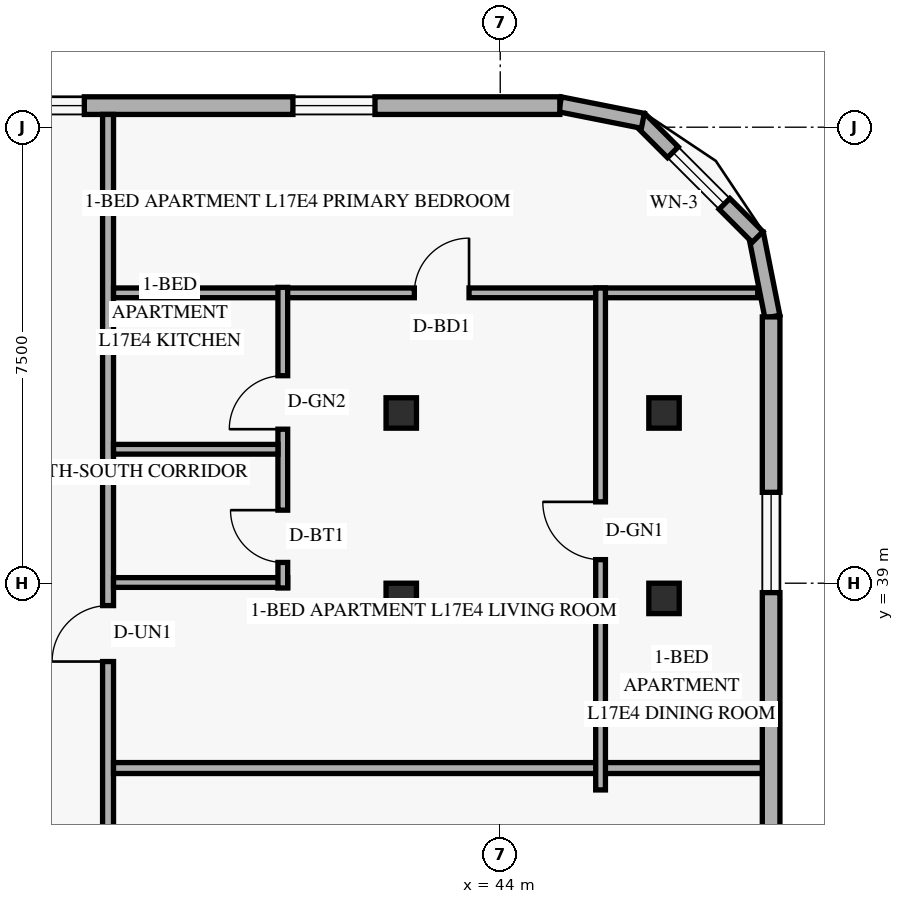
"""IFC4 building model, lengths in metres.
Left out: names, types, materials, properties, quantities, classifications, styles, units other than length and angle.
Written with IfcOpenShell. Run it as: python <this file> out.ifc"""

import sys

from ifc_helpers import new_model, si_unit, direction, frame, frame_2d, origin, origin_2d, place, context, subcontext, project, spatial, rectangle, hollow_rectangle, extrude, element, fill, save


model = new_model("IFC4")
c1 = context("Model", 3, precision=1e-05, world=origin(), true_north=direction((0.0, 1.0)))
c2 = subcontext(c1, "Body", "Model", "MODEL_VIEW")
j1 = project(units=[si_unit("LENGTHUNIT", "METRE"), si_unit("PLANEANGLEUNIT", "RADIAN")], contexts=[c1])
p1 = place(None, origin())
s1 = spatial("IfcSite", under=j1, at=p1, CompositionType="ELEMENT")
p2 = place(p1, origin())
s2 = spatial("IfcBuilding", under=s1, at=p2, CompositionType="ELEMENT")
p3 = place(p2, frame((0.0, 0.0, 67.8)))
s3 = spatial("IfcBuildingStorey", under=s2, at=p3, CompositionType="ELEMENT", Elevation=67.8)
for number, where, z_axis, x_axis in (
    (1, (42.309, 38.75, 0.0), (0.035, 0.0, 0.999), (0.0, 1.0, 0.0)),
    (2, (42.309, 41.8, 0.0), (0.035, 0.0, 0.999), (0.0, 1.0, 0.0)),
):
    element("IfcColumn", number, at=place(p3, frame(where, z_axis=z_axis, x_axis=x_axis)), inside=s3, PredefinedType="COLUMN", context=c2, shape_type="SweptSolid", body=[
        extrude(hollow_rectangle(XDim=0.5, YDim=0.5, WallThickness=0.022, at=origin_2d()), origin(), (0.0, 0.0, 1.0), 3.602),
    ])
for number, where, z_axis, x_axis in (
    (3, (46.589, 38.75, 0.0), (0.058, 0.0, 0.998), (0.0, 1.0, 0.0)),
    (4, (46.589, 41.8, 0.0), (0.058, 0.0, 0.998), (0.0, 1.0, 0.0)),
):
    element("IfcColumn", number, at=place(p3, frame(where, z_axis=z_axis, x_axis=x_axis)), inside=s3, PredefinedType="COLUMN", context=c2, shape_type="SweptSolid", body=[
        extrude(hollow_rectangle(XDim=0.5, YDim=0.5, WallThickness=0.022, at=origin_2d()), origin(), (0.0, 0.0, 1.0), 3.606),
    ])
p4 = place(p3, frame((48.476, 43.384, 0.0), z_axis=(0.0, 0.0, 1.0), x_axis=(-0.19496651342, 0.980809899341, 0.0)))
e5 = element("IfcWall", 5, at=p4, inside=s3, PredefinedType="SOLIDWALL", context=c2, shape_type="SweptSolid", body=[
    extrude(rectangle(XDim=1.389, YDim=0.25, at=frame_2d((0.694, 0.0))), origin(), (0.0, 0.0, 1.0), 3.3),
])
p5 = place(p3, frame((48.232, 44.695, 0.0), z_axis=(0.0, 0.0, 1.0), x_axis=(-0.707106781187, 0.707106781187, 0.0)))
e6 = element("IfcWall", 6, at=p5, inside=s3, PredefinedType="SOLIDWALL", context=c2, shape_type="SweptSolid", body=[
    extrude(rectangle(XDim=2.739, YDim=0.25, at=frame_2d((1.37, 0.0))), origin(), (0.0, 0.0, 1.0), 3.3),
])
p6 = place(p5, frame((0.77, 0.0, 0.85)))
e7 = element("IfcOpeningElement", 7, at=p6, cuts=e6, PredefinedType="OPENING", context=c2, shape_type="SweptSolid", body=[
    extrude(rectangle(XDim=1.2, YDim=1.5, at=frame_2d((0.6, 0.75))), frame((0.0, 0.135, 0.0), z_axis=(0.0, -1.0, 0.0), x_axis=(1.0, 0.0, 0.0)), (0.0, 0.0, 1.0), 0.27),
])
p7 = place(p3, frame((46.345, 46.605, 0.0), z_axis=(0.0, 0.0, 1.0), x_axis=(-0.980809899341, 0.19496651342, 0.0)))
e8 = element("IfcWall", 8, at=p7, inside=s3, PredefinedType="SOLIDWALL", context=c2, shape_type="SweptSolid", body=[
    extrude(rectangle(XDim=1.389, YDim=0.25, at=frame_2d((0.694, 0.0))), origin(), (0.0, 0.0, 1.0), 3.3),
])
p8 = place(p3, frame((48.455, 4.62, 0.0), z_axis=(0.0, 0.0, 1.0), x_axis=(0.0, 1.0, 0.0)))
e9 = element("IfcWall", 9, at=p8, inside=s3, PredefinedType="SOLIDWALL", context=c2, shape_type="SweptSolid", body=[
    extrude(rectangle(XDim=38.76, YDim=0.29, at=frame_2d((19.38, 0.0))), origin(), (0.0, 0.0, 1.0), 3.3),
])
p9 = place(p8, frame((2.885, 0.0, 0.85)))
e10 = element("IfcOpeningElement", 10, at=p9, cuts=e9, PredefinedType="OPENING", context=c2, shape_type="SweptSolid", body=[
    extrude(rectangle(XDim=1.65, YDim=1.6, at=frame_2d((0.825, 0.8))), frame((0.0, 0.155, 0.0), z_axis=(0.0, -1.0, 0.0), x_axis=(1.0, 0.0, 0.0)), (0.0, 0.0, 1.0), 0.31),
])
p10 = place(p8, frame((9.54, 0.0, 0.85)))
e11 = element("IfcOpeningElement", 11, at=p10, cuts=e9, PredefinedType="OPENING", context=c2, shape_type="SweptSolid", body=[
    extrude(rectangle(XDim=1.65, YDim=1.6, at=frame_2d((0.825, 0.8))), frame((0.0, 0.155, 0.0), z_axis=(0.0, -1.0, 0.0), x_axis=(1.0, 0.0, 0.0)), (0.0, 0.0, 1.0), 0.31),
])
p11 = place(p8, frame((15.52, 0.0, 0.85)))
e12 = element("IfcOpeningElement", 12, at=p11, cuts=e9, PredefinedType="OPENING", context=c2, shape_type="SweptSolid", body=[
    extrude(rectangle(XDim=1.65, YDim=1.6, at=frame_2d((0.825, 0.8))), frame((0.0, 0.155, 0.0), z_axis=(0.0, -1.0, 0.0), x_axis=(1.0, 0.0, 0.0)), (0.0, 0.0, 1.0), 0.31),
])
p12 = place(p8, frame((21.5, 0.0, 0.85)))
e13 = element("IfcOpeningElement", 13, at=p12, cuts=e9, PredefinedType="OPENING", context=c2, shape_type="SweptSolid", body=[
    extrude(rectangle(XDim=1.65, YDim=1.6, at=frame_2d((0.825, 0.8))), frame((0.0, 0.155, 0.0), z_axis=(0.0, -1.0, 0.0), x_axis=(1.0, 0.0, 0.0)), (0.0, 0.0, 1.0), 0.31),
])
p13 = place(p8, frame((27.48, 0.0, 0.85)))
e14 = element("IfcOpeningElement", 14, at=p13, cuts=e9, PredefinedType="OPENING", context=c2, shape_type="SweptSolid", body=[
    extrude(rectangle(XDim=1.65, YDim=1.6, at=frame_2d((0.825, 0.8))), frame((0.0, 0.155, 0.0), z_axis=(0.0, -1.0, 0.0), x_axis=(1.0, 0.0, 0.0)), (0.0, 0.0, 1.0), 0.31),
])
p14 = place(p8, frame((34.225, 0.0, 0.85)))
e15 = element("IfcOpeningElement", 15, at=p14, cuts=e9, PredefinedType="OPENING", context=c2, shape_type="SweptSolid", body=[
    extrude(rectangle(XDim=1.65, YDim=1.6, at=frame_2d((0.825, 0.8))), frame((0.0, 0.155, 0.0), z_axis=(0.0, -1.0, 0.0), x_axis=(1.0, 0.0, 0.0)), (0.0, 0.0, 1.0), 0.31),
])
p15 = place(p3, frame((44.98, 46.855, 0.0), z_axis=(0.0, 0.0, 1.0), x_axis=(-1.0, 0.0, 0.0)))
e16 = element("IfcWall", 16, at=p15, inside=s3, PredefinedType="SOLIDWALL", context=c2, shape_type="SweptSolid", body=[
    extrude(rectangle(XDim=39.56, YDim=0.29, at=frame_2d((19.78, 0.0))), origin(), (0.0, 0.0, 1.0), 3.3),
])
p16 = place(p15, frame((35.445, 0.0, 0.85)))
e17 = element("IfcOpeningElement", 17, at=p16, cuts=e16, PredefinedType="OPENING", context=c2, shape_type="SweptSolid", body=[
    extrude(rectangle(XDim=1.35, YDim=1.55, at=frame_2d((0.675, 0.775))), frame((0.0, 0.155, 0.0), z_axis=(0.0, -1.0, 0.0), x_axis=(1.0, 0.0, 0.0)), (0.0, 0.0, 1.0), 0.31),
])
p17 = place(p15, frame((31.18, 0.0, 0.85)))
e18 = element("IfcOpeningElement", 18, at=p17, cuts=e16, PredefinedType="OPENING", context=c2, shape_type="SweptSolid", body=[
    extrude(rectangle(XDim=1.2, YDim=1.5, at=frame_2d((0.6, 0.75))), frame((0.0, 0.155, 0.0), z_axis=(0.0, -1.0, 0.0), x_axis=(1.0, 0.0, 0.0)), (0.0, 0.0, 1.0), 0.31),
])
p18 = place(p15, frame((25.834, 0.0, 0.85)))
e19 = element("IfcOpeningElement", 19, at=p18, cuts=e16, PredefinedType="OPENING", context=c2, shape_type="SweptSolid", body=[
    extrude(rectangle(XDim=1.35, YDim=1.55, at=frame_2d((0.675, 0.775))), frame((0.0, 0.155, 0.0), z_axis=(0.0, -1.0, 0.0), x_axis=(1.0, 0.0, 0.0)), (0.0, 0.0, 1.0), 0.31),
])
p19 = place(p15, frame((18.799, 0.0, 0.85)))
e20 = element("IfcOpeningElement", 20, at=p19, cuts=e16, PredefinedType="OPENING", context=c2, shape_type="SweptSolid", body=[
    extrude(rectangle(XDim=1.35, YDim=1.55, at=frame_2d((0.675, 0.775))), frame((0.0, 0.155, 0.0), z_axis=(0.0, -1.0, 0.0), x_axis=(1.0, 0.0, 0.0)), (0.0, 0.0, 1.0), 0.31),
])
p20 = place(p15, frame((12.51, 0.0, 0.85)))
e21 = element("IfcOpeningElement", 21, at=p20, cuts=e16, PredefinedType="OPENING", context=c2, shape_type="SweptSolid", body=[
    extrude(rectangle(XDim=1.35, YDim=1.55, at=frame_2d((0.675, 0.775))), frame((0.0, 0.155, 0.0), z_axis=(0.0, -1.0, 0.0), x_axis=(1.0, 0.0, 0.0)), (0.0, 0.0, 1.0), 0.31),
])
p21 = place(p15, frame((7.82, 0.0, 0.85)))
e22 = element("IfcOpeningElement", 22, at=p21, cuts=e16, PredefinedType="OPENING", context=c2, shape_type="SweptSolid", body=[
    extrude(rectangle(XDim=1.35, YDim=1.55, at=frame_2d((0.675, 0.775))), frame((0.0, 0.155, 0.0), z_axis=(0.0, -1.0, 0.0), x_axis=(1.0, 0.0, 0.0)), (0.0, 0.0, 1.0), 0.31),
])
p22 = place(p15, frame((3.04, 0.0, 0.85)))
e23 = element("IfcOpeningElement", 23, at=p22, cuts=e16, PredefinedType="OPENING", context=c2, shape_type="SweptSolid", body=[
    extrude(rectangle(XDim=1.35, YDim=1.55, at=frame_2d((0.675, 0.775))), frame((0.0, 0.155, 0.0), z_axis=(0.0, -1.0, 0.0), x_axis=(1.0, 0.0, 0.0)), (0.0, 0.0, 1.0), 0.31),
])
p23 = place(p3, frame((37.55, 1.29, 0.0), z_axis=(0.0, 0.0, 1.0), x_axis=(0.0, 1.0, 0.0)))
e24 = element("IfcWall", 24, at=p23, inside=s3, PredefinedType="STANDARD", context=c2, shape_type="SweptSolid", body=[
    extrude(rectangle(XDim=45.42, YDim=0.18, at=frame_2d((22.71, 0.0))), origin(), (0.0, 0.0, 1.0), 2.589),
])
p24 = place(p23, frame((4.81, 0.0, 0.0)))
e25 = element("IfcOpeningElement", 25, at=p24, cuts=e24, PredefinedType="OPENING", context=c2, shape_type="SweptSolid", body=[
    extrude(rectangle(XDim=0.92, YDim=2.15, at=frame_2d((0.46, 1.075))), frame((0.0, 0.1, 0.0), z_axis=(0.0, -1.0, 0.0), x_axis=(1.0, 0.0, 0.0)), (0.0, 0.0, 1.0), 0.2),
])
p25 = place(p23, frame((15.75, 0.0, 0.0)))
e26 = element("IfcOpeningElement", 26, at=p25, cuts=e24, PredefinedType="OPENING", context=c2, shape_type="SweptSolid", body=[
    extrude(rectangle(XDim=0.92, YDim=2.15, at=frame_2d((0.46, 1.075))), frame((0.0, 0.1, 0.0), z_axis=(0.0, -1.0, 0.0), x_axis=(1.0, 0.0, 0.0)), (0.0, 0.0, 1.0), 0.2),
])
p26 = place(p23, frame((27.71, 0.0, 0.0)))
e27 = element("IfcOpeningElement", 27, at=p26, cuts=e24, PredefinedType="OPENING", context=c2, shape_type="SweptSolid", body=[
    extrude(rectangle(XDim=0.92, YDim=2.15, at=frame_2d((0.46, 1.075))), frame((0.0, 0.1, 0.0), z_axis=(0.0, -1.0, 0.0), x_axis=(1.0, 0.0, 0.0)), (0.0, 0.0, 1.0), 0.2),
])
p27 = place(p23, frame((36.422, 0.0, 0.0)))
e28 = element("IfcOpeningElement", 28, at=p27, cuts=e24, PredefinedType="OPENING", context=c2, shape_type="SweptSolid", body=[
    extrude(rectangle(XDim=0.92, YDim=2.15, at=frame_2d((0.46, 1.075))), frame((0.0, 0.1, 0.0), z_axis=(0.0, -1.0, 0.0), x_axis=(1.0, 0.0, 0.0)), (0.0, 0.0, 1.0), 0.2),
])
p28 = place(p3, frame((37.64, 35.96, 0.0), z_axis=(0.0, 0.0, 1.0), x_axis=(1.0, 0.0, 0.0)))
e29 = element("IfcWall", 29, at=p28, inside=s3, PredefinedType="PARTITIONING", context=c2, shape_type="SweptSolid", body=[
    extrude(rectangle(XDim=10.67, YDim=0.18, at=frame_2d((5.335, 0.0))), origin(), (0.0, 0.0, 1.0), 2.589),
])
p29 = place(p3, frame((37.64, 43.776, 0.0), z_axis=(0.0, 0.0, 1.0), x_axis=(1.0, 0.0, 0.0)))
e30 = element("IfcWall", 30, at=p29, inside=s3, PredefinedType="PARTITIONING", context=c2, shape_type="SweptSolid", body=[
    extrude(rectangle(XDim=10.595, YDim=0.16, at=frame_2d((5.297, 0.0))), origin(), (0.0, 0.0, 1.0), 3.3),
])
p30 = place(p29, frame((4.947, 0.0, 0.0)))
e31 = element("IfcOpeningElement", 31, at=p30, cuts=e30, PredefinedType="OPENING", context=c2, shape_type="SweptSolid", body=[
    extrude(rectangle(XDim=0.9, YDim=2.14, at=frame_2d((0.45, 1.07))), frame((0.0, 0.09, 0.0), z_axis=(0.0, -1.0, 0.0), x_axis=(1.0, 0.0, 0.0)), (0.0, 0.0, 1.0), 0.18),
])
p31 = place(p3, frame((37.64, 39.012, 0.0), z_axis=(0.0, 0.0, 1.0), x_axis=(1.0, 0.0, 0.0)))
e32 = element("IfcWall", 32, at=p31, inside=s3, PredefinedType="PLUMBINGWALL", context=c2, shape_type="SweptSolid", body=[
    extrude(rectangle(XDim=2.864, YDim=0.16, at=frame_2d((1.432, 0.0))), origin(), (0.0, 0.0, 1.0), 3.3),
])
p32 = place(p3, frame((40.424, 38.922, 0.0), z_axis=(0.0, 0.0, 1.0), x_axis=(0.0, 1.0, 0.0)))
e33 = element("IfcWall", 33, at=p32, inside=s3, PredefinedType="PLUMBINGWALL", context=c2, shape_type="SweptSolid", body=[
    extrude(rectangle(XDim=4.944, YDim=0.16, at=frame_2d((2.472, 0.0))), origin(), (0.0, 0.0, 1.0), 2.749),
])
p33 = place(p32, frame((0.42, 0.0, 0.0)))
e34 = element("IfcOpeningElement", 34, at=p33, cuts=e33, PredefinedType="OPENING", context=c2, shape_type="SweptSolid", body=[
    extrude(rectangle(XDim=0.86, YDim=2.12, at=frame_2d((0.43, 1.06))), frame((0.0, 0.09, 0.0), z_axis=(0.0, -1.0, 0.0), x_axis=(1.0, 0.0, 0.0)), (0.0, 0.0, 1.0), 0.18),
])
p34 = place(p32, frame((2.611, 0.0, 0.0)))
e35 = element("IfcOpeningElement", 35, at=p34, cuts=e33, PredefinedType="OPENING", context=c2, shape_type="SweptSolid", body=[
    extrude(rectangle(XDim=0.88, YDim=2.12, at=frame_2d((0.44, 1.06))), frame((0.0, 0.09, 0.0), z_axis=(0.0, -1.0, 0.0), x_axis=(1.0, 0.0, 0.0)), (0.0, 0.0, 1.0), 0.18),
])
p35 = place(p3, frame((37.64, 41.203, 0.0), z_axis=(0.0, 0.0, 1.0), x_axis=(1.0, 0.0, 0.0)))
e36 = element("IfcWall", 36, at=p35, inside=s3, PredefinedType="PLUMBINGWALL", context=c2, shape_type="SweptSolid", body=[
    extrude(rectangle(XDim=2.704, YDim=0.16, at=frame_2d((1.352, 0.0))), origin(), (0.0, 0.0, 1.0), 3.3),
])
p36 = place(p3, frame((45.65, 35.6, 0.0), z_axis=(0.0, 0.0, 1.0), x_axis=(0.0, 1.0, 0.0)))
e37 = element("IfcWall", 37, at=p36, inside=s3, PredefinedType="PARTITIONING", context=c2, shape_type="SweptSolid", body=[
    extrude(rectangle(XDim=8.256, YDim=0.16, at=frame_2d((4.128, 0.0))), origin(), (0.0, 0.0, 1.0), 2.589),
])
p37 = place(p36, frame((3.788, 0.0, 0.0)))
e38 = element("IfcOpeningElement", 38, at=p37, cuts=e37, PredefinedType="OPENING", context=c2, shape_type="SweptSolid", body=[
    extrude(rectangle(XDim=0.95, YDim=2.15, at=frame_2d((0.475, 1.075))), frame((0.0, 0.09, 0.0), z_axis=(0.0, -1.0, 0.0), x_axis=(1.0, 0.0, 0.0)), (0.0, 0.0, 1.0), 0.18),
])
p38 = place(p6, origin())
e39 = element("IfcWindow", 39, at=p38, inside=s3, PartitioningType="SINGLE_PANEL", PredefinedType="WINDOW", context=c2, shape_type="SweptSolid", body=[
    extrude(rectangle(XDim=1.2, YDim=1.5, at=frame_2d((0.6, 0.75))), frame((0.0, 0.03, 0.0), z_axis=(0.0, -1.0, 0.0), x_axis=(1.0, 0.0, 0.0)), (0.0, 0.0, 1.0), 0.06),
])
fill(e7, e39)
p39 = place(p14, origin())
e40 = element("IfcWindow", 40, at=p39, inside=s3, PartitioningType="SINGLE_PANEL", PredefinedType="WINDOW", context=c2, shape_type="SweptSolid", body=[
    extrude(rectangle(XDim=1.65, YDim=1.6, at=frame_2d((0.825, 0.8))), frame((0.0, 0.03, 0.0), z_axis=(0.0, -1.0, 0.0), x_axis=(1.0, 0.0, 0.0)), (0.0, 0.0, 1.0), 0.06),
])
fill(e15, e40)
p40 = place(p21, origin())
e41 = element("IfcWindow", 41, at=p40, inside=s3, PartitioningType="SINGLE_PANEL", PredefinedType="WINDOW", context=c2, shape_type="SweptSolid", body=[
    extrude(rectangle(XDim=1.35, YDim=1.55, at=frame_2d((0.675, 0.775))), frame((0.0, 0.03, 0.0), z_axis=(0.0, -1.0, 0.0), x_axis=(1.0, 0.0, 0.0)), (0.0, 0.0, 1.0), 0.06),
])
fill(e22, e41)
p41 = place(p22, origin())
e42 = element("IfcWindow", 42, at=p41, inside=s3, PartitioningType="SINGLE_PANEL", PredefinedType="WINDOW", context=c2, shape_type="SweptSolid", body=[
    extrude(rectangle(XDim=1.35, YDim=1.55, at=frame_2d((0.675, 0.775))), frame((0.0, 0.03, 0.0), z_axis=(0.0, -1.0, 0.0), x_axis=(1.0, 0.0, 0.0)), (0.0, 0.0, 1.0), 0.06),
])
fill(e23, e42)
p42 = place(p37, origin())
e43 = element("IfcDoor", 43, at=p42, inside=s3, OperationType="SINGLE_SWING_RIGHT", PredefinedType="DOOR", context=c2, shape_type="SweptSolid", body=[
    extrude(rectangle(XDim=0.95, YDim=2.15, at=frame_2d((0.475, 1.075))), frame((0.0, 0.025, 0.0), z_axis=(0.0, -1.0, 0.0), x_axis=(1.0, 0.0, 0.0)), (0.0, 0.0, 1.0), 0.05),
])
fill(e38, e43)
p43 = place(p27, origin())
e44 = element("IfcDoor", 44, at=p43, inside=s3, OperationType="SINGLE_SWING_LEFT", PredefinedType="DOOR", context=c2, shape_type="SweptSolid", body=[
    extrude(rectangle(XDim=0.92, YDim=2.15, at=frame_2d((0.46, 1.075))), frame((0.0, 0.025, 0.0), z_axis=(0.0, -1.0, 0.0), x_axis=(1.0, 0.0, 0.0)), (0.0, 0.0, 1.0), 0.05),
])
fill(e28, e44)
p44 = place(p33, origin())
e45 = element("IfcDoor", 45, at=p44, inside=s3, OperationType="SINGLE_SWING_RIGHT", PredefinedType="DOOR", context=c2, shape_type="SweptSolid", body=[
    extrude(rectangle(XDim=0.86, YDim=2.12, at=frame_2d((0.43, 1.06))), frame((0.0, 0.025, 0.0), z_axis=(0.0, -1.0, 0.0), x_axis=(1.0, 0.0, 0.0)), (0.0, 0.0, 1.0), 0.05),
])
fill(e34, e45)
p45 = place(p34, origin())
e46 = element("IfcDoor", 46, at=p45, inside=s3, OperationType="SINGLE_SWING_LEFT", PredefinedType="DOOR", context=c2, shape_type="SweptSolid", body=[
    extrude(rectangle(XDim=0.88, YDim=2.12, at=frame_2d((0.44, 1.06))), frame((0.0, 0.025, 0.0), z_axis=(0.0, -1.0, 0.0), x_axis=(1.0, 0.0, 0.0)), (0.0, 0.0, 1.0), 0.05),
])
fill(e35, e46)
p46 = place(p30, origin())
e47 = element("IfcDoor", 47, at=p46, inside=s3, OperationType="SINGLE_SWING_RIGHT", PredefinedType="DOOR", context=c2, shape_type="SweptSolid", body=[
    extrude(rectangle(XDim=0.9, YDim=2.14, at=frame_2d((0.45, 1.07))), frame((0.0, 0.025, 0.0), z_axis=(0.0, -1.0, 0.0), x_axis=(1.0, 0.0, 0.0)), (0.0, 0.0, 1.0), 0.05),
])
fill(e31, e47)
save(model, sys.argv[1])
